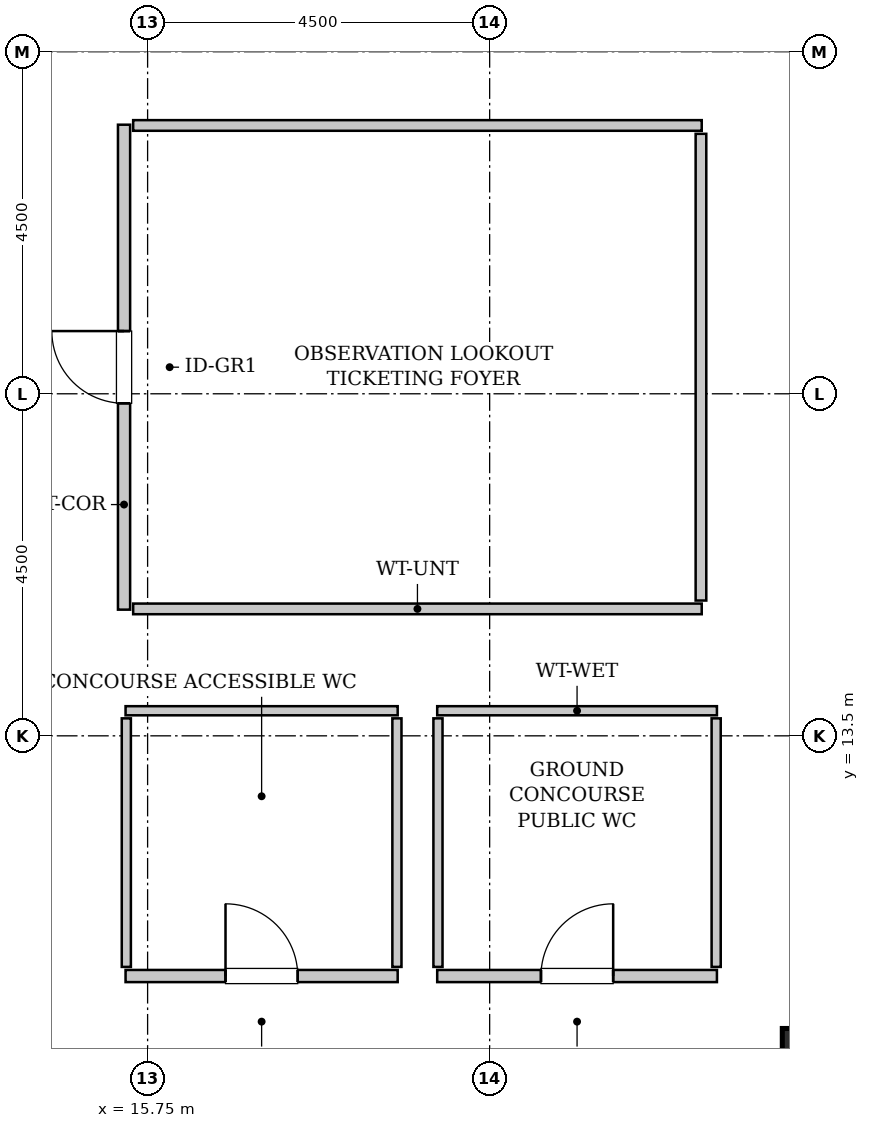
"""IFC4 building model, lengths in metres.
Left out: names, types, materials, properties, quantities, classifications, styles, units other than length and angle.
Written with IfcOpenShell. Run it as: python <this file> out.ifc"""

import sys

from ifc_helpers import new_model, si_unit, direction, frame, frame_2d, origin, origin_2d, place, context, subcontext, project, spatial, rectangle, hollow_rectangle, extrude, source, transform, mapped, element, fill, save


model = new_model("IFC4")
c1 = context("Model", 3, precision=1e-05, world=origin(), true_north=direction((0.0, 1.0)))
c2 = subcontext(c1, "Body", "Model", "MODEL_VIEW")
j1 = project(units=[si_unit("LENGTHUNIT", "METRE"), si_unit("PLANEANGLEUNIT", "RADIAN")], contexts=[c1])
p1 = place(None, origin())
s1 = spatial("IfcSite", under=j1, at=p1, CompositionType="ELEMENT")
p2 = place(p1, origin())
s2 = spatial("IfcBuilding", under=s1, at=p2, CompositionType="ELEMENT")
p3 = place(p2, origin())
s3 = spatial("IfcBuildingStorey", under=s2, at=p3, CompositionType="ELEMENT", Elevation=0.0)
m1 = source(origin(), c2, "Body", "SweptSolid", [
    extrude(hollow_rectangle(XDim=1.3, YDim=1.3, WallThickness=0.065, InnerFilletRadius=0.065, OuterFilletRadius=0.13, at=origin_2d()), origin(), (0.0, 0.0, 1.0), 6.0),
])
p4 = place(p3, frame((24.75, 9.0, 0.0), z_axis=(0.0, 0.0, 1.0), x_axis=(1.0, 0.0, 0.0)))
e1 = element("IfcColumn", 1, at=p4, inside=s3, PredefinedType="COLUMN", context=c2, shape_type="MappedRepresentation", body=[
    mapped(m1, transform((0.0, 0.0, 0.0), x_axis=(1.0, 0.0, 0.0), y_axis=(0.0, 1.0, 0.0), z_axis=(0.0, 0.0, 1.0), scale=1.0)),
])
m2 = source(origin(), c2, "Body", "SweptSolid", [
    extrude(rectangle(XDim=6.38, YDim=0.16, at=frame_2d((3.19, 0.0))), origin(), (0.0, 0.0, 1.0), 5.685),
])
p5 = place(p3, frame((15.44, 15.16, 0.0), z_axis=(0.0, 0.0, 1.0), x_axis=(0.0, 1.0, 0.0)))
e2 = element("IfcWall", 2, at=p5, inside=s3, PredefinedType="PARTITIONING", context=c2, shape_type="MappedRepresentation", body=[
    mapped(m2, transform((0.0, 0.0, 0.0), x_axis=(1.0, 0.0, 0.0), y_axis=(0.0, 1.0, 0.0), z_axis=(0.0, 0.0, 1.0), scale=1.0)),
])
p6 = place(p5, frame((2.715, 0.0, 0.0)))
e3 = element("IfcOpeningElement", 3, at=p6, cuts=e2, PredefinedType="OPENING", context=c2, shape_type="SweptSolid", body=[
    extrude(rectangle(XDim=0.95, YDim=2.1, at=frame_2d((0.475, 1.05))), frame((0.0, 0.09, 0.0), z_axis=(0.0, -1.0, 0.0), x_axis=(1.0, 0.0, 0.0)), (0.0, 0.0, 1.0), 0.18),
])
m3 = source(origin(), c2, "Body", "SweptSolid", [
    extrude(rectangle(XDim=7.48, YDim=0.14, at=frame_2d((3.74, 0.0))), origin(), (0.0, 0.0, 1.0), 5.685),
])
for number, where, z_axis, x_axis in (
    (4, (15.56, 15.17, 0.0), (0.0, 0.0, 1.0), (1.0, 0.0, 0.0)),
    (5, (15.56, 21.53, 0.0), (0.0, 0.0, 1.0), (1.0, 0.0, 0.0)),
):
    element("IfcWall", number, at=place(p3, frame(where, z_axis=z_axis, x_axis=x_axis)), inside=s3, PredefinedType="PARTITIONING", context=c2, shape_type="MappedRepresentation", body=[
        mapped(m3, transform((0.0, 0.0, 0.0), x_axis=(1.0, 0.0, 0.0), y_axis=(0.0, 1.0, 0.0), z_axis=(0.0, 0.0, 1.0), scale=1.0)),
    ])
m4 = source(origin(), c2, "Body", "SweptSolid", [
    extrude(rectangle(XDim=6.14, YDim=0.14, at=frame_2d((3.07, 0.0))), origin(), (0.0, 0.0, 1.0), 5.685),
])
p7 = place(p3, frame((23.03, 15.28, 0.0), z_axis=(0.0, 0.0, 1.0), x_axis=(0.0, 1.0, 0.0)))
e6 = element("IfcWall", 6, at=p7, inside=s3, PredefinedType="PARTITIONING", context=c2, shape_type="MappedRepresentation", body=[
    mapped(m4, transform((0.0, 0.0, 0.0), x_axis=(1.0, 0.0, 0.0), y_axis=(0.0, 1.0, 0.0), z_axis=(0.0, 0.0, 1.0), scale=1.0)),
])
m5 = source(origin(), c2, "Body", "SweptSolid", [
    extrude(rectangle(XDim=3.58, YDim=0.16, at=frame_2d((1.79, 0.0))), origin(), (0.0, 0.0, 1.0), 5.685),
])
p8 = place(p3, frame((15.46, 10.34, 0.0), z_axis=(0.0, 0.0, 1.0), x_axis=(1.0, 0.0, 0.0)))
e7 = element("IfcWall", 7, at=p8, inside=s3, PredefinedType="PARTITIONING", context=c2, shape_type="MappedRepresentation", body=[
    mapped(m5, transform((0.0, 0.0, 0.0), x_axis=(1.0, 0.0, 0.0), y_axis=(0.0, 1.0, 0.0), z_axis=(0.0, 0.0, 1.0), scale=1.0)),
])
p9 = place(p8, frame((1.315, 0.0, 0.0)))
e8 = element("IfcOpeningElement", 8, at=p9, cuts=e7, PredefinedType="OPENING", context=c2, shape_type="SweptSolid", body=[
    extrude(rectangle(XDim=0.95, YDim=2.1, at=frame_2d((0.475, 1.05))), frame((0.0, 0.09, 0.0), z_axis=(0.0, -1.0, 0.0), x_axis=(1.0, 0.0, 0.0)), (0.0, 0.0, 1.0), 0.18),
])
m6 = source(origin(), c2, "Body", "SweptSolid", [
    extrude(rectangle(XDim=3.58, YDim=0.12, at=frame_2d((1.79, 0.0))), origin(), (0.0, 0.0, 1.0), 5.685),
])
p10 = place(p3, frame((15.46, 13.83, 0.0), z_axis=(0.0, 0.0, 1.0), x_axis=(1.0, 0.0, 0.0)))
e9 = element("IfcWall", 9, at=p10, inside=s3, PredefinedType="PLUMBINGWALL", context=c2, shape_type="MappedRepresentation", body=[
    mapped(m6, transform((0.0, 0.0, 0.0), x_axis=(1.0, 0.0, 0.0), y_axis=(0.0, 1.0, 0.0), z_axis=(0.0, 0.0, 1.0), scale=1.0)),
])
m7 = source(origin(), c2, "Body", "SweptSolid", [
    extrude(rectangle(XDim=3.27, YDim=0.12, at=frame_2d((1.635, 0.0))), origin(), (0.0, 0.0, 1.0), 5.685),
])
for number, where, z_axis, x_axis in (
    (10, (19.03, 10.46, 0.0), (0.0, 0.0, 1.0), (0.0, 1.0, 0.0)),
    (11, (15.47, 10.46, 0.0), (0.0, 0.0, 1.0), (0.0, 1.0, 0.0)),
):
    element("IfcWall", number, at=place(p3, frame(where, z_axis=z_axis, x_axis=x_axis)), inside=s3, PredefinedType="PLUMBINGWALL", context=c2, shape_type="MappedRepresentation", body=[
        mapped(m7, transform((0.0, 0.0, 0.0), x_axis=(1.0, 0.0, 0.0), y_axis=(0.0, 1.0, 0.0), z_axis=(0.0, 0.0, 1.0), scale=1.0)),
    ])
m8 = source(origin(), c2, "Body", "SweptSolid", [
    extrude(rectangle(XDim=3.68, YDim=0.16, at=frame_2d((1.84, 0.0))), origin(), (0.0, 0.0, 1.0), 5.685),
])
p11 = place(p3, frame((19.56, 10.34, 0.0), z_axis=(0.0, 0.0, 1.0), x_axis=(1.0, 0.0, 0.0)))
e12 = element("IfcWall", 12, at=p11, inside=s3, PredefinedType="PARTITIONING", context=c2, shape_type="MappedRepresentation", body=[
    mapped(m8, transform((0.0, 0.0, 0.0), x_axis=(1.0, 0.0, 0.0), y_axis=(0.0, 1.0, 0.0), z_axis=(0.0, 0.0, 1.0), scale=1.0)),
])
p12 = place(p11, frame((1.365, 0.0, 0.0)))
e13 = element("IfcOpeningElement", 13, at=p12, cuts=e12, PredefinedType="OPENING", context=c2, shape_type="SweptSolid", body=[
    extrude(rectangle(XDim=0.95, YDim=2.1, at=frame_2d((0.475, 1.05))), frame((0.0, 0.09, 0.0), z_axis=(0.0, -1.0, 0.0), x_axis=(1.0, 0.0, 0.0)), (0.0, 0.0, 1.0), 0.18),
])
m9 = source(origin(), c2, "Body", "SweptSolid", [
    extrude(rectangle(XDim=3.68, YDim=0.12, at=frame_2d((1.84, 0.0))), origin(), (0.0, 0.0, 1.0), 5.685),
])
p13 = place(p3, frame((19.56, 13.83, 0.0), z_axis=(0.0, 0.0, 1.0), x_axis=(1.0, 0.0, 0.0)))
e14 = element("IfcWall", 14, at=p13, inside=s3, PredefinedType="PLUMBINGWALL", context=c2, shape_type="MappedRepresentation", body=[
    mapped(m9, transform((0.0, 0.0, 0.0), x_axis=(1.0, 0.0, 0.0), y_axis=(0.0, 1.0, 0.0), z_axis=(0.0, 0.0, 1.0), scale=1.0)),
])
for number, where, z_axis, x_axis in (
    (15, (23.23, 10.46, 0.0), (0.0, 0.0, 1.0), (0.0, 1.0, 0.0)),
    (16, (19.57, 10.46, 0.0), (0.0, 0.0, 1.0), (0.0, 1.0, 0.0)),
):
    element("IfcWall", number, at=place(p3, frame(where, z_axis=z_axis, x_axis=x_axis)), inside=s3, PredefinedType="PLUMBINGWALL", context=c2, shape_type="MappedRepresentation", body=[
        mapped(m7, transform((0.0, 0.0, 0.0), x_axis=(1.0, 0.0, 0.0), y_axis=(0.0, 1.0, 0.0), z_axis=(0.0, 0.0, 1.0), scale=1.0)),
    ])
m10 = source(origin(), c2, "Body", "SweptSolid", [
    extrude(rectangle(XDim=0.95, YDim=2.1, at=frame_2d((0.475, 1.05))), frame((0.0, 0.025, 0.0), z_axis=(0.0, -1.0, 0.0), x_axis=(1.0, 0.0, 0.0)), (0.0, 0.0, 1.0), 0.05),
])
p14 = place(p6, origin())
e17 = element("IfcDoor", 17, at=p14, inside=s3, OperationType="SINGLE_SWING_RIGHT", PredefinedType="DOOR", context=c2, shape_type="MappedRepresentation", body=[
    mapped(m10, transform((0.0, 0.0, 0.0), x_axis=(1.0, 0.0, 0.0), y_axis=(0.0, 1.0, 0.0), z_axis=(0.0, 0.0, 1.0), scale=1.0)),
])
fill(e3, e17)
p15 = place(p9, origin())
e18 = element("IfcDoor", 18, at=p15, inside=s3, OperationType="SINGLE_SWING_LEFT", PredefinedType="DOOR", context=c2, shape_type="MappedRepresentation", body=[
    mapped(m10, transform((0.0, 0.0, 0.0), x_axis=(1.0, 0.0, 0.0), y_axis=(0.0, 1.0, 0.0), z_axis=(0.0, 0.0, 1.0), scale=1.0)),
])
fill(e8, e18)
p16 = place(p12, origin())
e19 = element("IfcDoor", 19, at=p16, inside=s3, OperationType="SINGLE_SWING_RIGHT", PredefinedType="DOOR", context=c2, shape_type="MappedRepresentation", body=[
    mapped(m10, transform((0.0, 0.0, 0.0), x_axis=(1.0, 0.0, 0.0), y_axis=(0.0, 1.0, 0.0), z_axis=(0.0, 0.0, 1.0), scale=1.0)),
])
fill(e13, e19)
save(model, sys.argv[1])
